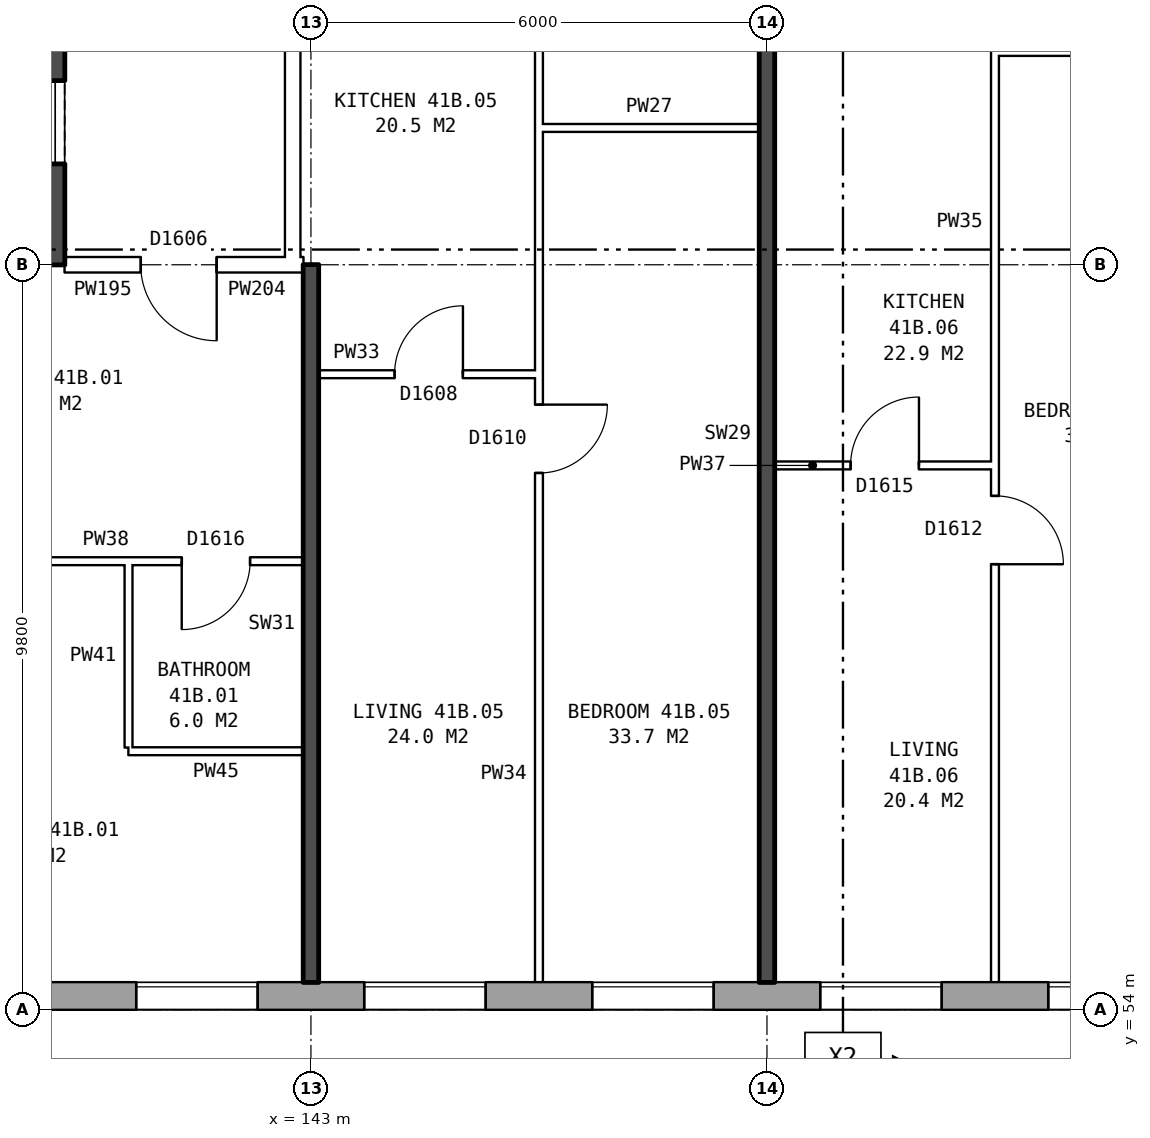
"""IFC4 building model, lengths in metres.
Left out: names, types, materials, properties, quantities, classifications, styles, units other than length and angle.
Written with IfcOpenShell. Run it as: python <this file> out.ifc"""

import sys

from ifc_helpers import new_model, si_unit, direction, frame, frame_2d, origin, place, context, subcontext, project, spatial, rectangle, extrude, element, fill, save


model = new_model("IFC4")
c1 = context("Model", 3, precision=1e-05, world=origin(), true_north=direction((0.0, 1.0)))
c2 = subcontext(c1, "Body", "Model", "MODEL_VIEW")
j1 = project(units=[si_unit("LENGTHUNIT", "METRE"), si_unit("PLANEANGLEUNIT", "RADIAN")], contexts=[c1])
p1 = place(None, origin())
s1 = spatial("IfcSite", under=j1, at=p1, CompositionType="ELEMENT")
p2 = place(p1, origin())
s2 = spatial("IfcBuilding", under=s1, at=p2, CompositionType="ELEMENT")
p3 = place(p2, frame((0.0, 0.0, 148.5)))
s3 = spatial("IfcBuildingStorey", under=s2, at=p3, CompositionType="ELEMENT", Elevation=148.5)
p4 = place(p3, frame((134.075, 54.18, 0.0), z_axis=(0.0, 0.0, 1.0), x_axis=(1.0, 0.0, 0.0)))
e1 = element("IfcWall", 1, at=p4, inside=s3, PredefinedType="STANDARD", context=c2, shape_type="SweptSolid", body=[
    extrude(rectangle(XDim=34.351, YDim=0.36, at=frame_2d((17.175, 0.0))), origin(), (0.0, 0.0, 1.0), 2.85),
])
p5 = place(p4, frame((0.625, 0.0, 0.8)))
e2 = element("IfcOpeningElement", 2, at=p5, cuts=e1, PredefinedType="OPENING", context=c2, shape_type="SweptSolid", body=[
    extrude(rectangle(XDim=1.6, YDim=1.8, at=frame_2d((0.8, 0.9))), frame((0.0, 0.19, 0.0), z_axis=(0.0, -1.0, 0.0), x_axis=(1.0, 0.0, 0.0)), (0.0, 0.0, 1.0), 0.38),
])
p6 = place(p4, frame((3.625, 0.0, 0.8)))
e3 = element("IfcOpeningElement", 3, at=p6, cuts=e1, PredefinedType="OPENING", context=c2, shape_type="SweptSolid", body=[
    extrude(rectangle(XDim=1.6, YDim=1.8, at=frame_2d((0.8, 0.9))), frame((0.0, 0.19, 0.0), z_axis=(0.0, -1.0, 0.0), x_axis=(1.0, 0.0, 0.0)), (0.0, 0.0, 1.0), 0.38),
])
p7 = place(p4, frame((6.625, 0.0, 0.8)))
e4 = element("IfcOpeningElement", 4, at=p7, cuts=e1, PredefinedType="OPENING", context=c2, shape_type="SweptSolid", body=[
    extrude(rectangle(XDim=1.6, YDim=1.8, at=frame_2d((0.8, 0.9))), frame((0.0, 0.19, 0.0), z_axis=(0.0, -1.0, 0.0), x_axis=(1.0, 0.0, 0.0)), (0.0, 0.0, 1.0), 0.38),
])
p8 = place(p4, frame((9.625, 0.0, 0.8)))
e5 = element("IfcOpeningElement", 5, at=p8, cuts=e1, PredefinedType="OPENING", context=c2, shape_type="SweptSolid", body=[
    extrude(rectangle(XDim=1.6, YDim=1.8, at=frame_2d((0.8, 0.9))), frame((0.0, 0.19, 0.0), z_axis=(0.0, -1.0, 0.0), x_axis=(1.0, 0.0, 0.0)), (0.0, 0.0, 1.0), 0.38),
])
p9 = place(p4, frame((12.625, 0.0, 0.8)))
e6 = element("IfcOpeningElement", 6, at=p9, cuts=e1, PredefinedType="OPENING", context=c2, shape_type="SweptSolid", body=[
    extrude(rectangle(XDim=1.6, YDim=1.8, at=frame_2d((0.8, 0.9))), frame((0.0, 0.19, 0.0), z_axis=(0.0, -1.0, 0.0), x_axis=(1.0, 0.0, 0.0)), (0.0, 0.0, 1.0), 0.38),
])
p10 = place(p4, frame((15.625, 0.0, 0.8)))
e7 = element("IfcOpeningElement", 7, at=p10, cuts=e1, PredefinedType="OPENING", context=c2, shape_type="SweptSolid", body=[
    extrude(rectangle(XDim=1.6, YDim=1.8, at=frame_2d((0.8, 0.9))), frame((0.0, 0.19, 0.0), z_axis=(0.0, -1.0, 0.0), x_axis=(1.0, 0.0, 0.0)), (0.0, 0.0, 1.0), 0.38),
])
p11 = place(p4, frame((18.625, 0.0, 0.8)))
e8 = element("IfcOpeningElement", 8, at=p11, cuts=e1, PredefinedType="OPENING", context=c2, shape_type="SweptSolid", body=[
    extrude(rectangle(XDim=1.6, YDim=1.8, at=frame_2d((0.8, 0.9))), frame((0.0, 0.19, 0.0), z_axis=(0.0, -1.0, 0.0), x_axis=(1.0, 0.0, 0.0)), (0.0, 0.0, 1.0), 0.38),
])
p12 = place(p4, frame((21.625, 0.0, 0.8)))
e9 = element("IfcOpeningElement", 9, at=p12, cuts=e1, PredefinedType="OPENING", context=c2, shape_type="SweptSolid", body=[
    extrude(rectangle(XDim=1.6, YDim=1.8, at=frame_2d((0.8, 0.9))), frame((0.0, 0.19, 0.0), z_axis=(0.0, -1.0, 0.0), x_axis=(1.0, 0.0, 0.0)), (0.0, 0.0, 1.0), 0.38),
])
p13 = place(p4, frame((24.625, 0.0, 0.8)))
e10 = element("IfcOpeningElement", 10, at=p13, cuts=e1, PredefinedType="OPENING", context=c2, shape_type="SweptSolid", body=[
    extrude(rectangle(XDim=1.6, YDim=1.8, at=frame_2d((0.8, 0.9))), frame((0.0, 0.19, 0.0), z_axis=(0.0, -1.0, 0.0), x_axis=(1.0, 0.0, 0.0)), (0.0, 0.0, 1.0), 0.38),
])
p14 = place(p4, frame((27.625, 0.0, 0.8)))
e11 = element("IfcOpeningElement", 11, at=p14, cuts=e1, PredefinedType="OPENING", context=c2, shape_type="SweptSolid", body=[
    extrude(rectangle(XDim=1.6, YDim=1.8, at=frame_2d((0.8, 0.9))), frame((0.0, 0.19, 0.0), z_axis=(0.0, -1.0, 0.0), x_axis=(1.0, 0.0, 0.0)), (0.0, 0.0, 1.0), 0.38),
])
p15 = place(p4, frame((30.625, 0.0, 0.8)))
e12 = element("IfcOpeningElement", 12, at=p15, cuts=e1, PredefinedType="OPENING", context=c2, shape_type="SweptSolid", body=[
    extrude(rectangle(XDim=1.6, YDim=1.8, at=frame_2d((0.8, 0.9))), frame((0.0, 0.19, 0.0), z_axis=(0.0, -1.0, 0.0), x_axis=(1.0, 0.0, 0.0)), (0.0, 0.0, 1.0), 0.38),
])
p16 = place(p3, frame((139.51, 63.8, 0.0), z_axis=(0.0, 0.0, 1.0), x_axis=(0.0, 1.0, 0.0)))
e13 = element("IfcWall", 13, at=p16, inside=s3, PredefinedType="SHEAR", context=c2, shape_type="SweptSolid", body=[
    extrude(rectangle(XDim=12.4, YDim=0.5, at=frame_2d((6.2, 0.0))), origin(), (0.0, 0.0, 1.0), 2.85),
])
p17 = place(p16, frame((1.325, 0.0, 0.0)))
e14 = element("IfcOpeningElement", 14, at=p17, cuts=e13, PredefinedType="OPENING", context=c2, shape_type="SweptSolid", body=[
    extrude(rectangle(XDim=1.1, YDim=2.1, at=frame_2d((0.55, 1.05))), frame((0.0, 0.26, 0.0), z_axis=(0.0, -1.0, 0.0), x_axis=(1.0, 0.0, 0.0)), (0.0, 0.0, 1.0), 0.52),
])
p18 = place(p16, frame((3.6, 0.0, 0.0)))
e15 = element("IfcOpeningElement", 15, at=p18, cuts=e13, PredefinedType="OPENING", context=c2, shape_type="SweptSolid", body=[
    extrude(rectangle(XDim=1.1, YDim=2.1, at=frame_2d((0.55, 1.05))), frame((0.0, 0.26, 0.0), z_axis=(0.0, -1.0, 0.0), x_axis=(1.0, 0.0, 0.0)), (0.0, 0.0, 1.0), 0.52),
])
p19 = place(p16, frame((5.8, 0.0, 0.0)))
e16 = element("IfcOpeningElement", 16, at=p19, cuts=e13, PredefinedType="OPENING", context=c2, shape_type="SweptSolid", body=[
    extrude(rectangle(XDim=1.1, YDim=2.1, at=frame_2d((0.55, 1.05))), frame((0.0, 0.26, 0.0), z_axis=(0.0, -1.0, 0.0), x_axis=(1.0, 0.0, 0.0)), (0.0, 0.0, 1.0), 0.52),
])
p20 = place(p16, frame((9.9, 0.0, 0.0)))
e17 = element("IfcOpeningElement", 17, at=p20, cuts=e13, PredefinedType="OPENING", context=c2, shape_type="SweptSolid", body=[
    extrude(rectangle(XDim=1.1, YDim=2.1, at=frame_2d((0.55, 1.05))), frame((0.0, 0.26, 0.0), z_axis=(0.0, -1.0, 0.0), x_axis=(1.0, 0.0, 0.0)), (0.0, 0.0, 1.0), 0.52),
])
p21 = place(p16, frame((8.125, 0.0, 0.0)))
e18 = element("IfcOpeningElement", 18, at=p21, cuts=e13, PredefinedType="OPENING", context=c2, shape_type="SweptSolid", body=[
    extrude(rectangle(XDim=0.85, YDim=2.1, at=frame_2d((0.425, 1.05))), frame((0.0, 0.26, 0.0), z_axis=(0.0, -1.0, 0.0), x_axis=(1.0, 0.0, 0.0)), (0.0, 0.0, 1.0), 0.52),
])
p22 = place(p3, frame((142.76, 63.9, 0.0), z_axis=(0.0, 0.0, 1.0), x_axis=(0.0, 1.0, 0.0)))
e19 = element("IfcWall", 19, at=p22, inside=s3, PredefinedType="PARTITIONING", context=c2, shape_type="SweptSolid", body=[
    extrude(rectangle(XDim=12.2, YDim=0.2, at=frame_2d((6.1, 0.0))), origin(), (0.0, 0.0, 1.0), 2.85),
])
p23 = place(p22, frame((5.1, 0.0, 0.0)))
e20 = element("IfcOpeningElement", 20, at=p23, cuts=e19, PredefinedType="OPENING", context=c2, shape_type="SweptSolid", body=[
    extrude(rectangle(XDim=2.0, YDim=2.1, at=frame_2d((1.0, 1.05))), frame((0.0, 0.11, 0.0), z_axis=(0.0, -1.0, 0.0), x_axis=(1.0, 0.0, 0.0)), (0.0, 0.0, 1.0), 0.22),
])
p24 = place(p3, frame((140.6, 57.4, 0.0), z_axis=(0.0, 0.0, 1.0), x_axis=(1.0, 0.0, 0.0)))
e21 = element("IfcWall", 21, at=p24, inside=s3, PredefinedType="PARTITIONING", context=c2, shape_type="SweptSolid", body=[
    extrude(rectangle(XDim=2.3, YDim=0.1, at=frame_2d((1.15, 0.0))), origin(), (0.0, 0.0, 1.0), 2.85),
])
p25 = place(p3, frame((137.1, 59.9, 0.0), z_axis=(0.0, 0.0, 1.0), x_axis=(1.0, 0.0, 0.0)))
e22 = element("IfcWall", 22, at=p25, inside=s3, PredefinedType="PARTITIONING", context=c2, shape_type="SweptSolid", body=[
    extrude(rectangle(XDim=5.8, YDim=0.1, at=frame_2d((2.9, 0.0))), origin(), (0.0, 0.0, 1.0), 2.85),
])
p26 = place(p25, frame((1.3, 0.0, 0.0)))
e23 = element("IfcOpeningElement", 23, at=p26, cuts=e22, PredefinedType="OPENING", context=c2, shape_type="SweptSolid", body=[
    extrude(rectangle(XDim=0.9, YDim=2.1, at=frame_2d((0.45, 1.05))), frame((0.0, 0.06, 0.0), z_axis=(0.0, -1.0, 0.0), x_axis=(1.0, 0.0, 0.0)), (0.0, 0.0, 1.0), 0.12),
])
p27 = place(p25, frame((4.2, 0.0, 0.0)))
e24 = element("IfcOpeningElement", 24, at=p27, cuts=e22, PredefinedType="OPENING", context=c2, shape_type="SweptSolid", body=[
    extrude(rectangle(XDim=0.9, YDim=2.1, at=frame_2d((0.45, 1.05))), frame((0.0, 0.06, 0.0), z_axis=(0.0, -1.0, 0.0), x_axis=(1.0, 0.0, 0.0)), (0.0, 0.0, 1.0), 0.12),
])
p28 = place(p3, frame((149.1, 61.16, 0.0), z_axis=(0.0, 0.0, 1.0), x_axis=(1.0, 0.0, 0.0)))
e25 = element("IfcWall", 25, at=p28, inside=s3, PredefinedType="PARTITIONING", context=c2, shape_type="SweptSolid", body=[
    extrude(rectangle(XDim=2.9, YDim=0.1, at=frame_2d((1.45, 0.0))), origin(), (0.0, 0.0, 1.0), 2.85),
])
p29 = place(p28, frame((1.0, 0.0, 0.0)))
e26 = element("IfcOpeningElement", 26, at=p29, cuts=e25, PredefinedType="OPENING", context=c2, shape_type="SweptSolid", body=[
    extrude(rectangle(XDim=0.9, YDim=2.1, at=frame_2d((0.45, 1.05))), frame((0.0, 0.06, 0.0), z_axis=(0.0, -1.0, 0.0), x_axis=(1.0, 0.0, 0.0)), (0.0, 0.0, 1.0), 0.12),
])
p30 = place(p3, frame((143.1, 62.36, 0.0), z_axis=(0.0, 0.0, 1.0), x_axis=(1.0, 0.0, 0.0)))
e27 = element("IfcWall", 27, at=p30, inside=s3, PredefinedType="PARTITIONING", context=c2, shape_type="SweptSolid", body=[
    extrude(rectangle(XDim=2.9, YDim=0.1, at=frame_2d((1.45, 0.0))), origin(), (0.0, 0.0, 1.0), 2.85),
])
p31 = place(p30, frame((1.0, 0.0, 0.0)))
e28 = element("IfcOpeningElement", 28, at=p31, cuts=e27, PredefinedType="OPENING", context=c2, shape_type="SweptSolid", body=[
    extrude(rectangle(XDim=0.9, YDim=2.1, at=frame_2d((0.45, 1.05))), frame((0.0, 0.06, 0.0), z_axis=(0.0, -1.0, 0.0), x_axis=(1.0, 0.0, 0.0)), (0.0, 0.0, 1.0), 0.12),
])
p32 = place(p3, frame((139.76, 63.8, 0.0), z_axis=(0.0, 0.0, 1.0), x_axis=(1.0, 0.0, 0.0)))
e29 = element("IfcWall", 29, at=p32, inside=s3, PredefinedType="PARTITIONING", context=c2, shape_type="SweptSolid", body=[
    extrude(rectangle(XDim=3.0, YDim=0.2, at=frame_2d((1.5, 0.0))), origin(), (0.0, 0.0, 1.0), 2.85),
])
p33 = place(p32, frame((1.0, 0.0, 0.0)))
e30 = element("IfcOpeningElement", 30, at=p33, cuts=e29, PredefinedType="OPENING", context=c2, shape_type="SweptSolid", body=[
    extrude(rectangle(XDim=1.0, YDim=2.1, at=frame_2d((0.5, 1.05))), frame((0.0, 0.11, 0.0), z_axis=(0.0, -1.0, 0.0), x_axis=(1.0, 0.0, 0.0)), (0.0, 0.0, 1.0), 0.22),
])
p34 = place(p3, frame((142.76, 63.8, 0.0), z_axis=(0.0, 0.0, 1.0), x_axis=(1.0, 0.0, 0.0)))
e31 = element("IfcWall", 31, at=p34, inside=s3, PredefinedType="PARTITIONING", context=c2, shape_type="SweptSolid", body=[
    extrude(rectangle(XDim=0.14, YDim=0.2, at=frame_2d((0.07, 0.0))), origin(), (0.0, 0.0, 1.0), 2.85),
])
for number, where, z_axis, x_axis in (
    (32, (146.0, 65.6, 0.0), (0.0, 0.0, 1.0), (1.0, 0.0, 0.0)),
    (33, (152.0, 66.6, 0.0), (0.0, 0.0, 1.0), (1.0, 0.0, 0.0)),
):
    element("IfcWall", number, at=place(p3, frame(where, z_axis=z_axis, x_axis=x_axis)), inside=s3, PredefinedType="PARTITIONING", context=c2, shape_type="SweptSolid", body=[
        extrude(rectangle(XDim=2.9, YDim=0.1, at=frame_2d((1.45, 0.0))), origin(), (0.0, 0.0, 1.0), 2.85),
    ])
p35 = place(p3, frame((140.6, 57.45, 0.0), z_axis=(0.0, 0.0, 1.0), x_axis=(0.0, 1.0, 0.0)))
e34 = element("IfcWall", 34, at=p35, inside=s3, PredefinedType="PARTITIONING", context=c2, shape_type="SweptSolid", body=[
    extrude(rectangle(XDim=2.4, YDim=0.1, at=frame_2d((1.2, 0.0))), origin(), (0.0, 0.0, 1.0), 2.85),
])
p36 = place(p3, frame((143.0, 54.36, 0.0), z_axis=(0.0, 0.0, 1.0), x_axis=(0.0, 1.0, 0.0)))
e35 = element("IfcWall", 35, at=p36, inside=s3, PredefinedType="SOLIDWALL", context=c2, shape_type="SweptSolid", body=[
    extrude(rectangle(XDim=9.44, YDim=0.2, at=frame_2d((4.72, 0.0))), origin(), (0.0, 0.0, 1.0), 2.85),
])
p37 = place(p3, frame((146.0, 54.36, 0.0), z_axis=(0.0, 0.0, 1.0), x_axis=(0.0, 1.0, 0.0)))
e36 = element("IfcWall", 36, at=p37, inside=s3, PredefinedType="PARTITIONING", context=c2, shape_type="SweptSolid", body=[
    extrude(rectangle(XDim=14.34, YDim=0.1, at=frame_2d((7.17, 0.0))), origin(), (0.0, 0.0, 1.0), 2.85),
])
p38 = place(p37, frame((6.7, 0.0, 0.0)))
e37 = element("IfcOpeningElement", 37, at=p38, cuts=e36, PredefinedType="OPENING", context=c2, shape_type="SweptSolid", body=[
    extrude(rectangle(XDim=0.9, YDim=2.1, at=frame_2d((0.45, 1.05))), frame((0.0, 0.06, 0.0), z_axis=(0.0, -1.0, 0.0), x_axis=(1.0, 0.0, 0.0)), (0.0, 0.0, 1.0), 0.12),
])
p39 = place(p37, frame((13.04, 0.0, 0.0)))
e38 = element("IfcOpeningElement", 38, at=p39, cuts=e36, PredefinedType="OPENING", context=c2, shape_type="SweptSolid", body=[
    extrude(rectangle(XDim=0.9, YDim=2.1, at=frame_2d((0.45, 1.05))), frame((0.0, 0.06, 0.0), z_axis=(0.0, -1.0, 0.0), x_axis=(1.0, 0.0, 0.0)), (0.0, 0.0, 1.0), 0.12),
])
p40 = place(p3, frame((149.0, 54.36, 0.0), z_axis=(0.0, 0.0, 1.0), x_axis=(0.0, 1.0, 0.0)))
e39 = element("IfcWall", 39, at=p40, inside=s3, PredefinedType="SOLIDWALL", context=c2, shape_type="SweptSolid", body=[
    extrude(rectangle(XDim=14.44, YDim=0.2, at=frame_2d((7.22, 0.0))), origin(), (0.0, 0.0, 1.0), 2.85),
])
p41 = place(p3, frame((152.0, 54.36, 0.0), z_axis=(0.0, 0.0, 1.0), x_axis=(0.0, 1.0, 0.0)))
e40 = element("IfcWall", 40, at=p41, inside=s3, PredefinedType="PARTITIONING", context=c2, shape_type="SweptSolid", body=[
    extrude(rectangle(XDim=14.34, YDim=0.1, at=frame_2d((7.17, 0.0))), origin(), (0.0, 0.0, 1.0), 2.85),
])
p42 = place(p41, frame((5.5, 0.0, 0.0)))
e41 = element("IfcOpeningElement", 41, at=p42, cuts=e40, PredefinedType="OPENING", context=c2, shape_type="SweptSolid", body=[
    extrude(rectangle(XDim=0.9, YDim=2.1, at=frame_2d((0.45, 1.05))), frame((0.0, 0.06, 0.0), z_axis=(0.0, -1.0, 0.0), x_axis=(1.0, 0.0, 0.0)), (0.0, 0.0, 1.0), 0.12),
])
p43 = place(p41, frame((13.04, 0.0, 0.0)))
e42 = element("IfcOpeningElement", 42, at=p43, cuts=e40, PredefinedType="OPENING", context=c2, shape_type="SweptSolid", body=[
    extrude(rectangle(XDim=0.9, YDim=2.1, at=frame_2d((0.45, 1.05))), frame((0.0, 0.06, 0.0), z_axis=(0.0, -1.0, 0.0), x_axis=(1.0, 0.0, 0.0)), (0.0, 0.0, 1.0), 0.12),
])
p44 = place(p7, origin())
e43 = element("IfcWindow", 43, at=p44, inside=s3, PartitioningType="SINGLE_PANEL", PredefinedType="WINDOW", context=c2, shape_type="SweptSolid", body=[
    extrude(rectangle(XDim=1.6, YDim=1.8, at=frame_2d((0.8, 0.9))), frame((0.0, 0.15, 0.0), z_axis=(0.0, -1.0, 0.0), x_axis=(1.0, 0.0, 0.0)), (0.0, 0.0, 1.0), 0.06),
])
fill(e4, e43)
p45 = place(p8, origin())
e44 = element("IfcWindow", 44, at=p45, inside=s3, PartitioningType="SINGLE_PANEL", PredefinedType="WINDOW", context=c2, shape_type="SweptSolid", body=[
    extrude(rectangle(XDim=1.6, YDim=1.8, at=frame_2d((0.8, 0.9))), frame((0.0, 0.15, 0.0), z_axis=(0.0, -1.0, 0.0), x_axis=(1.0, 0.0, 0.0)), (0.0, 0.0, 1.0), 0.06),
])
fill(e5, e44)
p46 = place(p9, origin())
e45 = element("IfcWindow", 45, at=p46, inside=s3, PartitioningType="SINGLE_PANEL", PredefinedType="WINDOW", context=c2, shape_type="SweptSolid", body=[
    extrude(rectangle(XDim=1.6, YDim=1.8, at=frame_2d((0.8, 0.9))), frame((0.0, 0.15, 0.0), z_axis=(0.0, -1.0, 0.0), x_axis=(1.0, 0.0, 0.0)), (0.0, 0.0, 1.0), 0.06),
])
fill(e6, e45)
p47 = place(p10, origin())
e46 = element("IfcWindow", 46, at=p47, inside=s3, PartitioningType="SINGLE_PANEL", PredefinedType="WINDOW", context=c2, shape_type="SweptSolid", body=[
    extrude(rectangle(XDim=1.6, YDim=1.8, at=frame_2d((0.8, 0.9))), frame((0.0, 0.15, 0.0), z_axis=(0.0, -1.0, 0.0), x_axis=(1.0, 0.0, 0.0)), (0.0, 0.0, 1.0), 0.06),
])
fill(e7, e46)
p48 = place(p11, origin())
e47 = element("IfcWindow", 47, at=p48, inside=s3, PartitioningType="SINGLE_PANEL", PredefinedType="WINDOW", context=c2, shape_type="SweptSolid", body=[
    extrude(rectangle(XDim=1.6, YDim=1.8, at=frame_2d((0.8, 0.9))), frame((0.0, 0.15, 0.0), z_axis=(0.0, -1.0, 0.0), x_axis=(1.0, 0.0, 0.0)), (0.0, 0.0, 1.0), 0.06),
])
fill(e8, e47)
p49 = place(p33, frame((1.0, 0.0, 0.0), z_axis=(0.0, 0.0, 1.0), x_axis=(-1.0, 0.0, 0.0)))
e48 = element("IfcDoor", 48, at=p49, inside=s3, OperationType="SINGLE_SWING_LEFT", PredefinedType="DOOR", context=c2, shape_type="SweptSolid", body=[
    extrude(rectangle(XDim=1.0, YDim=2.1, at=frame_2d((0.5, 1.05))), frame((0.0, 0.025, 0.0), z_axis=(0.0, -1.0, 0.0), x_axis=(1.0, 0.0, 0.0)), (0.0, 0.0, 1.0), 0.05),
])
fill(e30, e48)
p50 = place(p27, frame((0.9, 0.0, 0.0), z_axis=(0.0, 0.0, 1.0), x_axis=(-1.0, 0.0, 0.0)))
e49 = element("IfcDoor", 49, at=p50, inside=s3, OperationType="SINGLE_SWING_RIGHT", PredefinedType="DOOR", context=c2, shape_type="SweptSolid", body=[
    extrude(rectangle(XDim=0.9, YDim=2.1, at=frame_2d((0.45, 1.05))), frame((0.0, 0.025, 0.0), z_axis=(0.0, -1.0, 0.0), x_axis=(1.0, 0.0, 0.0)), (0.0, 0.0, 1.0), 0.05),
])
fill(e24, e49)
p51 = place(p38, frame((0.9, 0.0, 0.0), z_axis=(0.0, 0.0, 1.0), x_axis=(-1.0, 0.0, 0.0)))
e50 = element("IfcDoor", 50, at=p51, inside=s3, OperationType="SINGLE_SWING_LEFT", PredefinedType="DOOR", context=c2, shape_type="SweptSolid", body=[
    extrude(rectangle(XDim=0.9, YDim=2.1, at=frame_2d((0.45, 1.05))), frame((0.0, 0.025, 0.0), z_axis=(0.0, -1.0, 0.0), x_axis=(1.0, 0.0, 0.0)), (0.0, 0.0, 1.0), 0.05),
])
fill(e37, e50)
p52 = place(p31, origin())
e51 = element("IfcDoor", 51, at=p52, inside=s3, OperationType="SINGLE_SWING_RIGHT", PredefinedType="DOOR", context=c2, shape_type="SweptSolid", body=[
    extrude(rectangle(XDim=0.9, YDim=2.1, at=frame_2d((0.45, 1.05))), frame((0.0, 0.025, 0.0), z_axis=(0.0, -1.0, 0.0), x_axis=(1.0, 0.0, 0.0)), (0.0, 0.0, 1.0), 0.05),
])
fill(e28, e51)
p53 = place(p42, frame((0.9, 0.0, 0.0), z_axis=(0.0, 0.0, 1.0), x_axis=(-1.0, 0.0, 0.0)))
e52 = element("IfcDoor", 52, at=p53, inside=s3, OperationType="SINGLE_SWING_RIGHT", PredefinedType="DOOR", context=c2, shape_type="SweptSolid", body=[
    extrude(rectangle(XDim=0.9, YDim=2.1, at=frame_2d((0.45, 1.05))), frame((0.0, 0.025, 0.0), z_axis=(0.0, -1.0, 0.0), x_axis=(1.0, 0.0, 0.0)), (0.0, 0.0, 1.0), 0.05),
])
fill(e41, e52)
p54 = place(p29, origin())
e53 = element("IfcDoor", 53, at=p54, inside=s3, OperationType="SINGLE_SWING_RIGHT", PredefinedType="DOOR", context=c2, shape_type="SweptSolid", body=[
    extrude(rectangle(XDim=0.9, YDim=2.1, at=frame_2d((0.45, 1.05))), frame((0.0, 0.025, 0.0), z_axis=(0.0, -1.0, 0.0), x_axis=(1.0, 0.0, 0.0)), (0.0, 0.0, 1.0), 0.05),
])
fill(e26, e53)
save(model, sys.argv[1])
